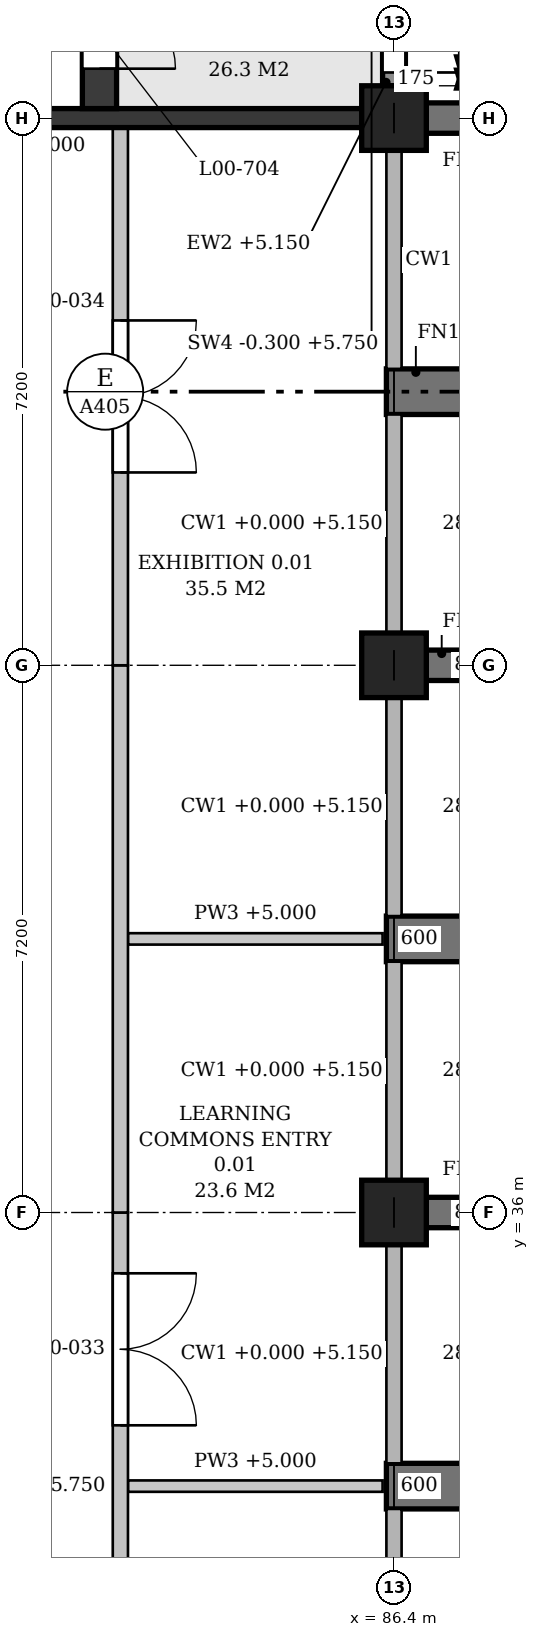
"""IFC4 building model, lengths in metres.
Left out: names, types, materials, properties, quantities, classifications, styles, units other than length and angle.
Written with IfcOpenShell. Run it as: python <this file> out.ifc"""

import sys

from ifc_helpers import new_model, si_unit, direction, frame, frame_2d, origin, origin_2d, place, context, subcontext, project, spatial, polyline, rectangle, outline, extrude, element, fill, save


model = new_model("IFC4")
c1 = context("Model", 3, precision=1e-05, world=origin(), true_north=direction((0.0, 1.0)))
c2 = subcontext(c1, "Body", "Model", "MODEL_VIEW")
j1 = project(units=[si_unit("LENGTHUNIT", "METRE"), si_unit("PLANEANGLEUNIT", "RADIAN")], contexts=[c1])
p1 = place(None, origin())
s1 = spatial("IfcSite", under=j1, at=p1, CompositionType="ELEMENT")
p2 = place(p1, origin())
s2 = spatial("IfcBuilding", under=s1, at=p2, CompositionType="ELEMENT")
p3 = place(p2, origin())
s3 = spatial("IfcBuildingStorey", under=s2, at=p3, CompositionType="ELEMENT", Elevation=0.0)
for number, where, z_axis, x_axis in (
    (1, (86.4, 36.0, 0.0), (0.0, 0.0, 1.0), (1.0, 0.0, 0.0)),
    (2, (86.4, 43.2, 0.0), (0.0, 0.0, 1.0), (1.0, 0.0, 0.0)),
    (3, (86.4, 50.4, 0.0), (0.0, 0.0, 1.0), (1.0, 0.0, 0.0)),
):
    element("IfcColumn", number, at=place(p3, frame(where, z_axis=z_axis, x_axis=x_axis)), inside=s3, PredefinedType="COLUMN", context=c2, shape_type="SweptSolid", body=[
        extrude(rectangle(XDim=0.85, YDim=0.85, at=origin_2d()), origin(), (0.0, 0.0, 1.0), 6.0),
    ])
p4 = place(p3, frame((86.4, 50.825, 0.0), z_axis=(0.0, 0.0, 1.0), x_axis=(0.0, 1.0, 0.0)))
e4 = element("IfcWall", 4, at=p4, inside=s3, PredefinedType="STANDARD", context=c2, shape_type="SweptSolid", body=[
    extrude(rectangle(XDim=6.35, YDim=0.3, at=frame_2d((3.175, 0.0))), origin(), (0.0, 0.0, 1.0), 5.15),
])
p5 = place(p4, frame((0.175, 0.0, 0.0)))
e5 = element("IfcOpeningElement", 5, at=p5, cuts=e4, PredefinedType="OPENING", context=c2, shape_type="SweptSolid", body=[
    extrude(rectangle(XDim=1.1, YDim=2.1, at=frame_2d((0.55, 1.05))), frame((0.0, 0.16, 0.0), z_axis=(0.0, -1.0, 0.0), x_axis=(1.0, 0.0, 0.0)), (0.0, 0.0, 1.0), 0.32),
])
p6 = place(p4, frame((4.525, 0.0, 0.9)))
e6 = element("IfcOpeningElement", 6, at=p6, cuts=e4, PredefinedType="OPENING", context=c2, shape_type="SweptSolid", body=[
    extrude(outline(polyline([(0.0, 0.0), (0.9, 0.0), (0.9, 3.55), (0.45, 4.0), (0.0, 3.55), (0.0, 0.0)])), frame((0.0, 0.16, 0.0), z_axis=(0.0, -1.0, 0.0), x_axis=(1.0, 0.0, 0.0)), (0.0, 0.0, 1.0), 0.32),
])
for number, where, z_axis, x_axis in (
    (7, (86.3, 32.4, 0.0), (0.0, 0.0, 1.0), (1.0, 0.0, 0.0)),
    (8, (86.3, 39.6, 0.0), (0.0, 0.0, 1.0), (1.0, 0.0, 0.0)),
    (9, (86.3, 46.8, 0.0), (0.0, 0.0, 1.0), (1.0, 0.0, 0.0)),
):
    element("IfcWall", number, at=place(p3, frame(where, z_axis=z_axis, x_axis=x_axis)), inside=s3, PredefinedType="POLYGONAL", context=c2, shape_type="SweptSolid", body=[
        extrude(outline(polyline([(1.0, 0.0), (1.0, 20.975), (0.75, 21.35), (0.35, 21.35), (0.35, 20.75), (0.0, 20.75), (0.0, 16.8), (0.35, 16.8), (0.35, 15.95), (0.0, 15.95), (0.0, 11.4), (0.35, 11.4), (0.35, 10.55), (0.0, 10.55), (0.0, 6.0), (0.35, 6.0), (0.35, 5.15), (0.0, 5.15), (0.0, 0.0), (1.0, 0.0)])), frame((0.0, 0.3, 0.0), z_axis=(0.0, -1.0, 0.0), x_axis=(1.0, 0.0, 0.0)), (0.0, 0.0, 1.0), 0.6),
    ])
for number, where, z_axis, x_axis in (
    (10, (86.825, 36.0, 0.0), (0.0, 0.0, 1.0), (1.0, 0.0, 0.0)),
    (11, (86.825, 43.2, 0.0), (0.0, 0.0, 1.0), (1.0, 0.0, 0.0)),
    (12, (86.825, 50.4, 0.0), (0.0, 0.0, 1.0), (1.0, 0.0, 0.0)),
):
    element("IfcWall", number, at=place(p3, frame(where, z_axis=z_axis, x_axis=x_axis)), inside=s3, PredefinedType="POLYGONAL", context=c2, shape_type="SweptSolid", body=[
        extrude(outline(polyline([(1.2, 0.0), (1.2, 20.825), (0.85, 21.35), (0.0, 21.35), (0.0, 0.0), (1.2, 0.0)])), frame((0.0, 0.2, 0.0), z_axis=(0.0, -1.0, 0.0), x_axis=(1.0, 0.0, 0.0)), (0.0, 0.0, 1.0), 0.4),
    ])
p7 = place(p3, frame((79.625, 50.4, 0.0), z_axis=(0.0, 0.0, 1.0), x_axis=(1.0, 0.0, 0.0)))
e13 = element("IfcWall", 13, at=p7, inside=s3, PredefinedType="SHEAR", context=c2, shape_type="SweptSolid", body=[
    extrude(rectangle(XDim=6.35, YDim=0.25, at=frame_2d((3.175, 0.0))), origin(), (0.0, 0.0, 1.0), 5.0),
])
p8 = place(p7, frame((0.425, 0.0, 0.0)))
e14 = element("IfcOpeningElement", 14, at=p8, cuts=e13, PredefinedType="OPENING", context=c2, shape_type="SweptSolid", body=[
    extrude(rectangle(XDim=1.1, YDim=2.1, at=frame_2d((0.55, 1.05))), frame((0.0, 0.135, 0.0), z_axis=(0.0, -1.0, 0.0), x_axis=(1.0, 0.0, 0.0)), (0.0, 0.0, 1.0), 0.27),
])
p9 = place(p3, frame((82.525, 50.525, 0.0), z_axis=(0.0, 0.0, 1.0), x_axis=(0.0, 1.0, 0.0)))
e15 = element("IfcWall", 15, at=p9, inside=s3, PredefinedType="SHEAR", context=c2, shape_type="SweptSolid", body=[
    extrude(rectangle(XDim=6.925, YDim=0.45, at=frame_2d((3.462, 0.0))), origin(), (0.0, 0.0, 1.0), 5.75),
])
p10 = place(p9, frame((0.525, 0.0, 0.0)))
e16 = element("IfcOpeningElement", 16, at=p10, cuts=e15, PredefinedType="OPENING", context=c2, shape_type="SweptSolid", body=[
    extrude(rectangle(XDim=1.0, YDim=2.1, at=frame_2d((0.5, 1.05))), frame((0.0, 0.235, 0.0), z_axis=(0.0, -1.0, 0.0), x_axis=(1.0, 0.0, 0.0)), (0.0, 0.0, 1.0), 0.47),
])
for number, where, z_axis, x_axis in (
    (17, (82.9, 32.4, 0.0), (0.0, 0.0, 1.0), (1.0, 0.0, 0.0)),
    (18, (82.9, 39.6, 0.0), (0.0, 0.0, 1.0), (1.0, 0.0, 0.0)),
):
    element("IfcWall", number, at=place(p3, frame(where, z_axis=z_axis, x_axis=x_axis)), inside=s3, PredefinedType="PARTITIONING", context=c2, shape_type="SweptSolid", body=[
        extrude(rectangle(XDim=3.35, YDim=0.15, at=frame_2d((1.675, 0.0))), origin(), (0.0, 0.0, 1.0), 5.0),
    ])
p11 = place(p3, frame((82.8, 28.8, 0.0), z_axis=(0.0, 0.0, 1.0), x_axis=(0.0, 1.0, 0.0)))
e19 = element("IfcWall", 19, at=p11, inside=s3, PredefinedType="PARTITIONING", context=c2, shape_type="SweptSolid", body=[
    extrude(outline(polyline([(0.0, 0.0), (7.2, 0.0), (7.2, 5.0), (6.95, 5.0), (6.95, 5.75), (0.25, 5.75), (0.25, 5.0), (0.0, 5.0), (0.0, 0.0)])), frame((0.0, 0.1, 0.0), z_axis=(0.0, -1.0, 0.0), x_axis=(1.0, 0.0, 0.0)), (0.0, 0.0, 1.0), 0.2),
])
p12 = place(p11, frame((4.4, 0.0, 0.0)))
e20 = element("IfcOpeningElement", 20, at=p12, cuts=e19, PredefinedType="OPENING", context=c2, shape_type="SweptSolid", body=[
    extrude(rectangle(XDim=2.0, YDim=2.1, at=frame_2d((1.0, 1.05))), frame((0.0, 0.11, 0.0), z_axis=(0.0, -1.0, 0.0), x_axis=(1.0, 0.0, 0.0)), (0.0, 0.0, 1.0), 0.22),
])
p13 = place(p3, frame((82.8, 36.0, 0.0), z_axis=(0.0, 0.0, 1.0), x_axis=(0.0, 1.0, 0.0)))
e21 = element("IfcWall", 21, at=p13, inside=s3, PredefinedType="PARTITIONING", context=c2, shape_type="SweptSolid", body=[
    extrude(outline(polyline([(0.0, 0.0), (7.2, 0.0), (7.2, 5.0), (6.95, 5.0), (6.95, 5.75), (0.25, 5.75), (0.25, 5.0), (0.0, 5.0), (0.0, 0.0)])), frame((0.0, 0.1, 0.0), z_axis=(0.0, -1.0, 0.0), x_axis=(1.0, 0.0, 0.0)), (0.0, 0.0, 1.0), 0.2),
])
p14 = place(p3, frame((82.8, 43.2, 0.0), z_axis=(0.0, 0.0, 1.0), x_axis=(0.0, 1.0, 0.0)))
e22 = element("IfcWall", 22, at=p14, inside=s3, PredefinedType="PARTITIONING", context=c2, shape_type="SweptSolid", body=[
    extrude(outline(polyline([(0.0, 0.0), (7.075, 0.0), (7.075, 5.0), (6.95, 5.0), (6.95, 5.75), (0.25, 5.75), (0.25, 5.0), (0.0, 5.0), (0.0, 0.0)])), frame((0.0, 0.1, 0.0), z_axis=(0.0, -1.0, 0.0), x_axis=(1.0, 0.0, 0.0)), (0.0, 0.0, 1.0), 0.2),
])
p15 = place(p14, frame((2.537, 0.0, 0.0)))
e23 = element("IfcOpeningElement", 23, at=p15, cuts=e22, PredefinedType="OPENING", context=c2, shape_type="SweptSolid", body=[
    extrude(rectangle(XDim=2.0, YDim=2.1, at=frame_2d((1.0, 1.05))), frame((0.0, 0.11, 0.0), z_axis=(0.0, -1.0, 0.0), x_axis=(1.0, 0.0, 0.0)), (0.0, 0.0, 1.0), 0.22),
])
p16 = place(p5, frame((1.1, 0.0, 0.0), z_axis=(0.0, 0.0, 1.0), x_axis=(-1.0, 0.0, 0.0)))
e24 = element("IfcDoor", 24, at=p16, inside=s3, OperationType="SINGLE_SWING_RIGHT", PredefinedType="DOOR", context=c2, shape_type="SweptSolid", body=[
    extrude(rectangle(XDim=1.1, YDim=2.1, at=frame_2d((0.55, 1.05))), frame((0.0, 0.025, 0.0), z_axis=(0.0, -1.0, 0.0), x_axis=(1.0, 0.0, 0.0)), (0.0, 0.0, 1.0), 0.05),
])
fill(e5, e24)
p17 = place(p10, frame((1.0, 0.0, 0.0), z_axis=(0.0, 0.0, 1.0), x_axis=(-1.0, 0.0, 0.0)))
e25 = element("IfcDoor", 25, at=p17, inside=s3, OperationType="SINGLE_SWING_RIGHT", PredefinedType="DOOR", context=c2, shape_type="SweptSolid", body=[
    extrude(rectangle(XDim=1.0, YDim=2.1, at=frame_2d((0.5, 1.05))), frame((0.0, 0.025, 0.0), z_axis=(0.0, -1.0, 0.0), x_axis=(1.0, 0.0, 0.0)), (0.0, 0.0, 1.0), 0.05),
])
fill(e16, e25)
p18 = place(p12, origin())
e26 = element("IfcDoor", 26, at=p18, inside=s3, OperationType="DOUBLE_DOOR_SINGLE_SWING", PredefinedType="DOOR", context=c2, shape_type="SweptSolid", body=[
    extrude(rectangle(XDim=2.0, YDim=2.1, at=frame_2d((1.0, 1.05))), frame((0.0, 0.025, 0.0), z_axis=(0.0, -1.0, 0.0), x_axis=(1.0, 0.0, 0.0)), (0.0, 0.0, 1.0), 0.05),
])
fill(e20, e26)
p19 = place(p15, origin())
e27 = element("IfcDoor", 27, at=p19, inside=s3, OperationType="DOUBLE_DOOR_SINGLE_SWING", PredefinedType="DOOR", context=c2, shape_type="SweptSolid", body=[
    extrude(rectangle(XDim=2.0, YDim=2.1, at=frame_2d((1.0, 1.05))), frame((0.0, 0.025, 0.0), z_axis=(0.0, -1.0, 0.0), x_axis=(1.0, 0.0, 0.0)), (0.0, 0.0, 1.0), 0.05),
])
fill(e23, e27)
save(model, sys.argv[1])
